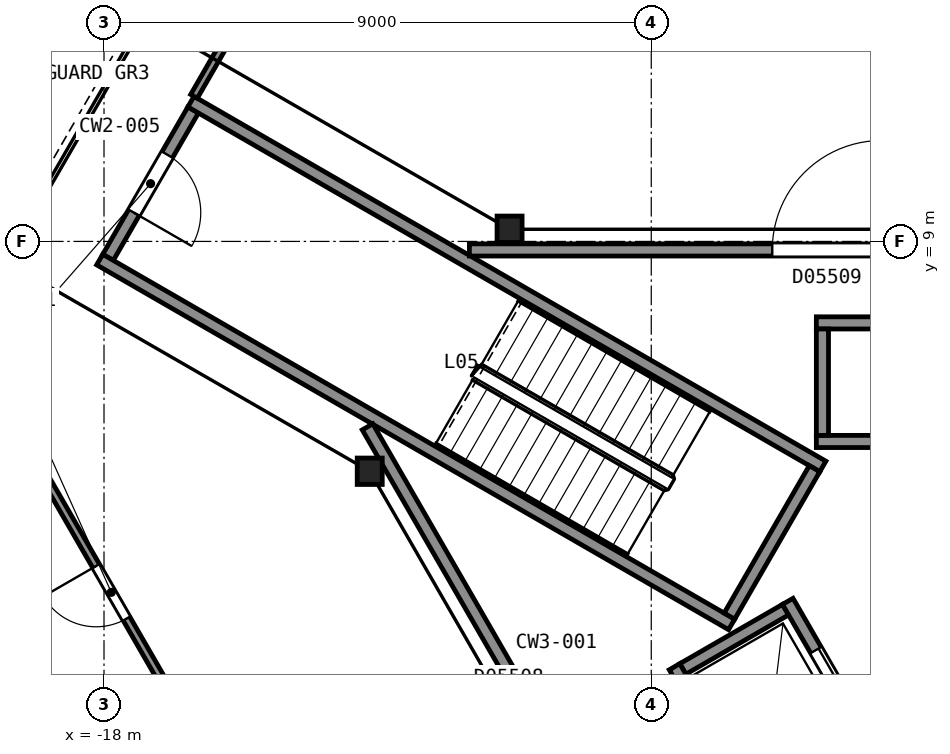
"""IFC4 building model, lengths in metres.
Left out: names, types, materials, properties, quantities, classifications, styles, units other than length and angle.
Written with IfcOpenShell. Run it as: python <this file> out.ifc"""

import sys

from ifc_helpers import new_model, si_unit, direction, frame, frame_2d, origin, origin_2d, place, context, subcontext, project, spatial, rectangle, i_section, extrude, element, fill, save


model = new_model("IFC4")
c1 = context("Model", 3, precision=1e-05, world=origin(), true_north=direction((0.0, 1.0)))
c2 = subcontext(c1, "Body", "Model", "MODEL_VIEW")
j1 = project(units=[si_unit("LENGTHUNIT", "METRE"), si_unit("PLANEANGLEUNIT", "RADIAN")], contexts=[c1])
p1 = place(None, origin())
s1 = spatial("IfcSite", under=j1, at=p1, CompositionType="ELEMENT")
p2 = place(p1, origin())
s2 = spatial("IfcBuilding", under=s1, at=p2, CompositionType="ELEMENT")
p3 = place(p2, frame((0.0, 0.0, 32.0)))
s3 = spatial("IfcBuildingStorey", under=s2, at=p3, CompositionType="ELEMENT", Elevation=32.0)
for number, where, z_axis, x_axis in (
    (1, (-11.33, 9.2, 0.0), (0.0, 0.0, 1.0), (1.0, 0.0, 0.0)),
    (2, (-13.63, 5.22, 0.0), (0.0, 0.0, 1.0), (1.0, 0.0, 0.0)),
):
    element("IfcColumn", number, at=place(p3, frame(where, z_axis=z_axis, x_axis=x_axis)), inside=s3, PredefinedType="COLUMN", context=c2, shape_type="SweptSolid", body=[
        extrude(i_section(OverallWidth=0.411, OverallDepth=0.434, WebThickness=0.036, FlangeThickness=0.057, FilletRadius=0.015, at=origin_2d()), origin(), (0.0, 0.0, 1.0), 4.8),
    ])
p4 = place(p3, frame((-16.534, 11.162, 0.0), z_axis=(0.0, 0.0, 1.0), x_axis=(-0.49998411664, -0.866034573852, 0.0)))
e3 = element("IfcWall", 3, at=p4, inside=s3, PredefinedType="PARTITIONING", context=c2, shape_type="SweptSolid", body=[
    extrude(rectangle(XDim=2.8, YDim=0.2, at=frame_2d((1.4, 0.0))), origin(), (0.0, 0.0, 1.0), 4.55),
])
p5 = place(p4, frame((0.85, 0.0, 0.0)))
e4 = element("IfcOpeningElement", 4, at=p5, cuts=e3, PredefinedType="OPENING", context=c2, shape_type="SweptSolid", body=[
    extrude(rectangle(XDim=1.1, YDim=2.1, at=frame_2d((0.55, 1.05))), frame((0.0, 0.11, 0.0), z_axis=(0.0, -1.0, 0.0), x_axis=(1.0, 0.0, 0.0)), (0.0, 0.0, 1.0), 0.22),
])
for number, where, z_axis, x_axis in (
    (5, (-7.678, 2.701, 0.0), (0.0, 0.0, 1.0), (-0.866, 0.5, 0.0)),
    (6, (-6.178, 5.299, 0.0), (0.0, 0.0, 1.0), (-0.866, 0.5, 0.0)),
):
    element("IfcWall", number, at=place(p3, frame(where, z_axis=z_axis, x_axis=x_axis)), inside=s3, PredefinedType="PARTITIONING", context=c2, shape_type="SweptSolid", body=[
        extrude(rectangle(XDim=12.0, YDim=0.2, at=frame_2d((6.0, 0.0))), origin(), (0.0, 0.0, 1.0), 4.55),
    ])
p6 = place(p3, frame((-6.315, 5.262, 0.0), z_axis=(0.0, 0.0, 1.0), x_axis=(-0.500049511043, -0.865996816683, 0.0)))
e7 = element("IfcWall", 7, at=p6, inside=s3, PredefinedType="PARTITIONING", context=c2, shape_type="SweptSolid", body=[
    extrude(rectangle(XDim=2.8, YDim=0.2, at=frame_2d((1.4, 0.0))), origin(), (0.0, 0.0, 1.0), 4.55),
])
for number, where, z_axis, x_axis in (
    (8, (-6.285, 5.71, 0.0), (0.0, 0.0, 1.0), (1.0, 0.0, 0.0)),
    (9, (-6.285, 7.66, 0.0), (0.0, 0.0, 1.0), (1.0, 0.0, 0.0)),
):
    element("IfcWall", number, at=place(p3, frame(where, z_axis=z_axis, x_axis=x_axis)), inside=s3, PredefinedType="PARTITIONING", context=c2, shape_type="SweptSolid", body=[
        extrude(rectangle(XDim=2.35, YDim=0.2, at=frame_2d((1.175, 0.0))), origin(), (0.0, 0.0, 1.0), 4.8),
    ])
p7 = place(p3, frame((-8.48, 1.969, 0.0), z_axis=(0.0, 0.0, 1.0), x_axis=(0.866000020948, 0.500043961785, 0.0)))
e10 = element("IfcWall", 10, at=p7, inside=s3, PredefinedType="PARTITIONING", context=c2, shape_type="SweptSolid", body=[
    extrude(rectangle(XDim=1.95, YDim=0.2, at=frame_2d((0.975, 0.0))), origin(), (0.0, 0.0, 1.0), 4.8),
])
p8 = place(p3, frame((-6.185, 5.81, 0.0), z_axis=(0.0, 0.0, 1.0), x_axis=(0.0, 1.0, 0.0)))
e11 = element("IfcWall", 11, at=p8, inside=s3, PredefinedType="PARTITIONING", context=c2, shape_type="SweptSolid", body=[
    extrude(rectangle(XDim=1.75, YDim=0.2, at=frame_2d((0.875, 0.0))), origin(), (0.0, 0.0, 1.0), 4.8),
])
p9 = place(p3, frame((-5.28, 0.525, 0.0), z_axis=(0.0, 0.0, 1.0), x_axis=(-0.500037662692, 0.866003658127, 0.0)))
e12 = element("IfcWall", 12, at=p9, inside=s3, PredefinedType="PARTITIONING", context=c2, shape_type="SweptSolid", body=[
    extrude(rectangle(XDim=2.95, YDim=0.2, at=frame_2d((1.475, 0.0))), origin(), (0.0, 0.0, 1.0), 4.8),
])
p10 = place(p9, frame((0.925, 0.0, 0.0)))
e13 = element("IfcOpeningElement", 13, at=p10, cuts=e12, PredefinedType="OPENING", context=c2, shape_type="SweptSolid", body=[
    extrude(rectangle(XDim=1.1, YDim=2.1, at=frame_2d((0.55, 1.05))), frame((0.0, 0.11, 0.0), z_axis=(0.0, -1.0, 0.0), x_axis=(1.0, 0.0, 0.0)), (0.0, 0.0, 1.0), 0.22),
])
p11 = place(p3, frame((-7.242, -0.376, 0.0), z_axis=(0.0, 0.0, 1.0), x_axis=(-0.499996545922, 0.866027397988, 0.0)))
e14 = element("IfcWall", 14, at=p11, inside=s3, PredefinedType="PARTITIONING", context=c2, shape_type="SweptSolid", body=[
    extrude(rectangle(XDim=2.75, YDim=0.2, at=frame_2d((1.375, 0.0))), origin(), (0.0, 0.0, 1.0), 4.8),
])
p12 = place(p3, frame((-13.666, 5.95, 0.0), z_axis=(0.0, 0.0, 1.0), x_axis=(0.499985890914, -0.866033549516, 0.0)))
e15 = element("IfcWall", 15, at=p12, inside=s3, PredefinedType="PARTITIONING", context=c2, shape_type="SweptSolid", body=[
    extrude(rectangle(XDim=14.921, YDim=0.2, at=frame_2d((7.461, 0.0))), origin(), (0.0, 0.0, 1.0), 4.55),
])
p13 = place(p12, frame((8.196, 0.0, 0.0)))
e16 = element("IfcOpeningElement", 16, at=p13, cuts=e15, PredefinedType="OPENING", context=c2, shape_type="SweptSolid", body=[
    extrude(rectangle(XDim=1.8, YDim=2.1, at=frame_2d((0.9, 1.05))), frame((0.0, 0.11, 0.0), z_axis=(0.0, -1.0, 0.0), x_axis=(1.0, 0.0, 0.0)), (0.0, 0.0, 1.0), 0.22),
])
p14 = place(p3, frame((0.263, 8.86, 0.0), z_axis=(0.0, 0.0, 1.0), x_axis=(-1.0, 0.0, 0.0)))
e17 = element("IfcWall", 17, at=p14, inside=s3, PredefinedType="PARTITIONING", context=c2, shape_type="SweptSolid", body=[
    extrude(rectangle(XDim=12.254, YDim=0.2, at=frame_2d((6.127, 0.0))), origin(), (0.0, 0.0, 1.0), 4.55),
])
p15 = place(p14, frame((5.473, 0.0, 0.0)))
e18 = element("IfcOpeningElement", 18, at=p15, cuts=e17, PredefinedType="OPENING", context=c2, shape_type="SweptSolid", body=[
    extrude(rectangle(XDim=1.8, YDim=2.1, at=frame_2d((0.9, 1.05))), frame((0.0, 0.11, 0.0), z_axis=(0.0, -1.0, 0.0), x_axis=(1.0, 0.0, 0.0)), (0.0, 0.0, 1.0), 0.22),
])
p16 = place(p3, frame((-4.438, -20.054, 0.0), z_axis=(0.0, 0.0, 1.0), x_axis=(-0.499994028088, 0.866028851642, 0.0)))
e19 = element("IfcWall", 19, at=p16, inside=s3, PredefinedType="PARTITIONING", context=c2, shape_type="SweptSolid", body=[
    extrude(rectangle(XDim=30.297, YDim=0.125, at=frame_2d((15.148, 0.0))), origin(), (0.0, 0.0, 1.0), 3.793),
])
p17 = place(p16, frame((26.385, 0.0, 0.0)))
e20 = element("IfcOpeningElement", 20, at=p17, cuts=e19, PredefinedType="OPENING", context=c2, shape_type="SweptSolid", body=[
    extrude(rectangle(XDim=1.0, YDim=2.1, at=frame_2d((0.5, 1.05))), frame((0.0, 0.073, 0.0), z_axis=(0.0, -1.0, 0.0), x_axis=(1.0, 0.0, 0.0)), (0.0, 0.0, 1.0), 0.145),
])
p18 = place(p16, frame((18.831, 0.0, 0.0)))
e21 = element("IfcOpeningElement", 21, at=p18, cuts=e19, PredefinedType="OPENING", context=c2, shape_type="SweptSolid", body=[
    extrude(rectangle(XDim=1.0, YDim=2.1, at=frame_2d((0.5, 1.05))), frame((0.0, 0.073, 0.0), z_axis=(0.0, -1.0, 0.0), x_axis=(1.0, 0.0, 0.0)), (0.0, 0.0, 1.0), 0.145),
])
p19 = place(p16, frame((10.449, 0.0, 0.0)))
e22 = element("IfcOpeningElement", 22, at=p19, cuts=e19, PredefinedType="OPENING", context=c2, shape_type="SweptSolid", body=[
    extrude(rectangle(XDim=1.0, YDim=2.1, at=frame_2d((0.5, 1.05))), frame((0.0, 0.073, 0.0), z_axis=(0.0, -1.0, 0.0), x_axis=(1.0, 0.0, 0.0)), (0.0, 0.0, 1.0), 0.145),
])
p20 = place(p16, frame((2.916, 0.0, 0.0)))
e23 = element("IfcOpeningElement", 23, at=p20, cuts=e19, PredefinedType="OPENING", context=c2, shape_type="SweptSolid", body=[
    extrude(rectangle(XDim=1.0, YDim=2.1, at=frame_2d((0.5, 1.05))), frame((0.0, 0.073, 0.0), z_axis=(0.0, -1.0, 0.0), x_axis=(1.0, 0.0, 0.0)), (0.0, 0.0, 1.0), 0.145),
])
p21 = place(p3, frame((-11.391, 20.27, 0.0), z_axis=(0.0, 0.0, 1.0), x_axis=(-0.499978599175, -0.866037759204, 0.0)))
e24 = element("IfcWall", 24, at=p21, inside=s3, PredefinedType="PARTITIONING", context=c2, shape_type="SweptSolid", body=[
    extrude(rectangle(XDim=10.258, YDim=0.125, at=frame_2d((5.129, 0.0))), origin(), (0.0, 0.0, 1.0), 3.793),
])
p22 = place(p21, frame((3.908, 0.0, 0.0)))
e25 = element("IfcOpeningElement", 25, at=p22, cuts=e24, PredefinedType="OPENING", context=c2, shape_type="SweptSolid", body=[
    extrude(rectangle(XDim=2.4, YDim=2.4, at=frame_2d((1.2, 1.2))), frame((0.0, 0.073, 0.0), z_axis=(0.0, -1.0, 0.0), x_axis=(1.0, 0.0, 0.0)), (0.0, 0.0, 1.0), 0.145),
])
p23 = place(p5, origin())
e26 = element("IfcDoor", 26, at=p23, inside=s3, OperationType="SINGLE_SWING_RIGHT", PredefinedType="DOOR", context=c2, shape_type="SweptSolid", body=[
    extrude(rectangle(XDim=1.1, YDim=2.1, at=frame_2d((0.55, 1.05))), frame((0.0, 0.025, 0.0), z_axis=(0.0, -1.0, 0.0), x_axis=(1.0, 0.0, 0.0)), (0.0, 0.0, 1.0), 0.05),
])
fill(e4, e26)
p24 = place(p10, origin())
e27 = element("IfcDoor", 27, at=p24, inside=s3, OperationType="SLIDING_TO_LEFT", PredefinedType="DOOR", context=c2, shape_type="SweptSolid", body=[
    extrude(rectangle(XDim=1.1, YDim=2.1, at=frame_2d((0.55, 1.05))), frame((0.0, 0.025, 0.0), z_axis=(0.0, -1.0, 0.0), x_axis=(1.0, 0.0, 0.0)), (0.0, 0.0, 1.0), 0.05),
])
fill(e13, e27)
p25 = place(p15, origin())
e28 = element("IfcDoor", 28, at=p25, inside=s3, OperationType="DOUBLE_DOOR_SINGLE_SWING", PredefinedType="DOOR", context=c2, shape_type="SweptSolid", body=[
    extrude(rectangle(XDim=1.8, YDim=2.1, at=frame_2d((0.9, 1.05))), frame((0.0, 0.025, 0.0), z_axis=(0.0, -1.0, 0.0), x_axis=(1.0, 0.0, 0.0)), (0.0, 0.0, 1.0), 0.05),
])
fill(e18, e28)
p26 = place(p17, origin())
e29 = element("IfcDoor", 29, at=p26, inside=s3, OperationType="SINGLE_SWING_RIGHT", PredefinedType="DOOR", context=c2, shape_type="SweptSolid", body=[
    extrude(rectangle(XDim=1.0, YDim=2.1, at=frame_2d((0.5, 1.05))), frame((0.0, 0.025, 0.0), z_axis=(0.0, -1.0, 0.0), x_axis=(1.0, 0.0, 0.0)), (0.0, 0.0, 1.0), 0.05),
])
fill(e20, e29)
save(model, sys.argv[1])
